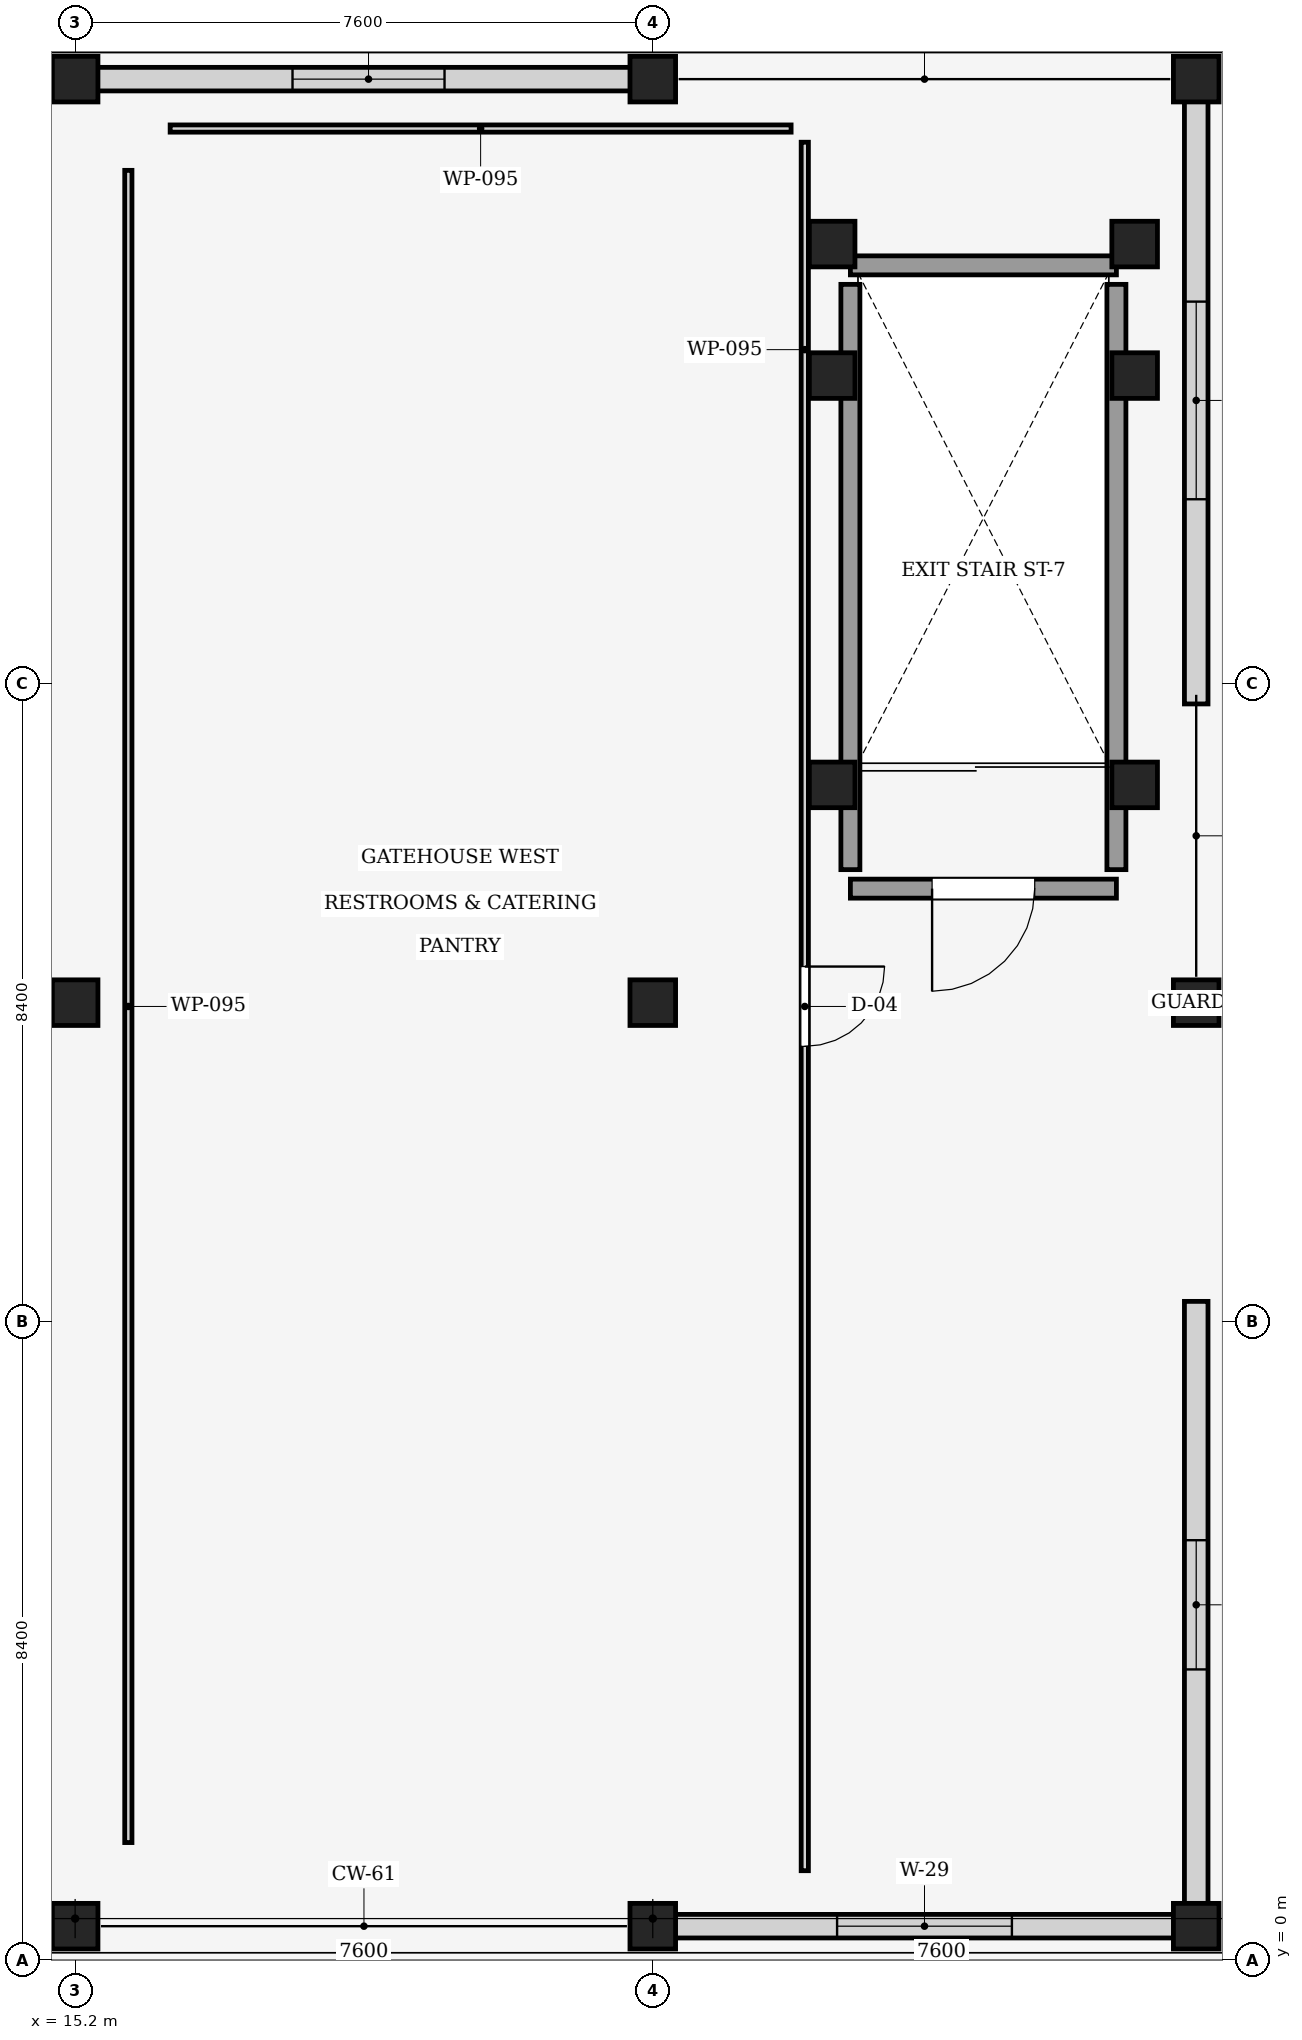
"""IFC4 building model, lengths in metres.
Left out: names, types, materials, properties, quantities, classifications, styles, units other than length and angle.
Written with IfcOpenShell. Run it as: python <this file> out.ifc"""

import sys

from ifc_helpers import new_model, si_unit, direction, frame, frame_2d, origin, origin_2d, place, context, subcontext, project, spatial, rectangle, extrude, element, fill, save


model = new_model("IFC4")
c1 = context("Model", 3, precision=1e-05, world=origin(), true_north=direction((0.0, 1.0)))
c2 = subcontext(c1, "Body", "Model", "MODEL_VIEW")
j1 = project(units=[si_unit("LENGTHUNIT", "METRE"), si_unit("PLANEANGLEUNIT", "RADIAN")], contexts=[c1])
p1 = place(None, origin())
s1 = spatial("IfcSite", under=j1, at=p1, CompositionType="ELEMENT")
p2 = place(p1, origin())
s2 = spatial("IfcBuilding", under=s1, at=p2, CompositionType="ELEMENT")
p3 = place(p2, frame((0.0, 0.0, 5.1)))
s3 = spatial("IfcBuildingStorey", under=s2, at=p3, CompositionType="ELEMENT", Elevation=5.1)
p4 = place(p3, frame((15.2, 0.45, 0.0), z_axis=(0.0, 0.0, 1.0), x_axis=(1.0, 0.0, 0.0)))
e1 = element("IfcColumn", 1, at=p4, inside=s3, PredefinedType="COLUMN", context=c2, shape_type="SweptSolid", body=[
    extrude(rectangle(XDim=0.6, YDim=0.6, at=origin_2d()), origin(), (0.0, 0.0, 1.0), 4.05),
])
p5 = place(p3, frame((15.2, 12.6, 0.0), z_axis=(0.0, 0.0, 1.0), x_axis=(1.0, 0.0, 0.0)))
e2 = element("IfcColumn", 2, at=p5, inside=s3, PredefinedType="COLUMN", context=c2, shape_type="SweptSolid", body=[
    extrude(rectangle(XDim=0.6, YDim=0.6, at=origin_2d()), origin(), (0.0, 0.0, 1.0), 7.0),
])
for number, where, z_axis, x_axis in (
    (3, (15.2, 24.75, 0.0), (0.0, 0.0, 1.0), (1.0, 0.0, 0.0)),
    (4, (22.8, 0.45, 0.0), (0.0, 0.0, 1.0), (1.0, 0.0, 0.0)),
):
    element("IfcColumn", number, at=place(p3, frame(where, z_axis=z_axis, x_axis=x_axis)), inside=s3, PredefinedType="COLUMN", context=c2, shape_type="SweptSolid", body=[
        extrude(rectangle(XDim=0.6, YDim=0.6, at=origin_2d()), origin(), (0.0, 0.0, 1.0), 4.05),
    ])
p6 = place(p3, frame((22.8, 12.6, 0.0), z_axis=(0.0, 0.0, 1.0), x_axis=(1.0, 0.0, 0.0)))
e5 = element("IfcColumn", 5, at=p6, inside=s3, PredefinedType="COLUMN", context=c2, shape_type="SweptSolid", body=[
    extrude(rectangle(XDim=0.6, YDim=0.6, at=origin_2d()), origin(), (0.0, 0.0, 1.0), 7.0),
])
for number, where, z_axis, x_axis in (
    (6, (22.8, 24.75, 0.0), (0.0, 0.0, 1.0), (1.0, 0.0, 0.0)),
    (7, (29.95, 0.45, 0.0), (0.0, 0.0, 1.0), (1.0, 0.0, 0.0)),
):
    element("IfcColumn", number, at=place(p3, frame(where, z_axis=z_axis, x_axis=x_axis)), inside=s3, PredefinedType="COLUMN", context=c2, shape_type="SweptSolid", body=[
        extrude(rectangle(XDim=0.6, YDim=0.6, at=origin_2d()), origin(), (0.0, 0.0, 1.0), 4.05),
    ])
p7 = place(p3, frame((29.95, 12.6, 0.0), z_axis=(0.0, 0.0, 1.0), x_axis=(1.0, 0.0, 0.0)))
e8 = element("IfcColumn", 8, at=p7, inside=s3, PredefinedType="COLUMN", context=c2, shape_type="SweptSolid", body=[
    extrude(rectangle(XDim=0.6, YDim=0.6, at=origin_2d()), origin(), (0.0, 0.0, 1.0), 7.0),
])
for number, where, z_axis, x_axis in (
    (9, (29.95, 24.75, 0.0), (0.0, 0.0, 1.0), (1.0, 0.0, 0.0)),
    (10, (29.14, 15.465, 0.0), (0.0, 0.0, 1.0), (1.0, 0.0, 0.0)),
    (11, (25.16, 15.465, 0.0), (0.0, 0.0, 1.0), (1.0, 0.0, 0.0)),
    (12, (29.14, 20.85, 0.0), (0.0, 0.0, 1.0), (1.0, 0.0, 0.0)),
    (13, (25.16, 20.85, 0.0), (0.0, 0.0, 1.0), (1.0, 0.0, 0.0)),
    (14, (29.14, 22.58, 0.0), (0.0, 0.0, 1.0), (1.0, 0.0, 0.0)),
    (15, (25.16, 22.58, 0.0), (0.0, 0.0, 1.0), (1.0, 0.0, 0.0)),
):
    element("IfcColumn", number, at=place(p3, frame(where, z_axis=z_axis, x_axis=x_axis)), inside=s3, PredefinedType="COLUMN", context=c2, shape_type="SweptSolid", body=[
        extrude(rectangle(XDim=0.6, YDim=0.6, at=origin_2d()), origin(), (0.0, 0.0, 1.0), 4.05),
    ])
p8 = place(p3, frame((29.715, 0.45, 0.0), z_axis=(0.0, 0.0, 1.0), x_axis=(-1.0, 0.0, 0.0)))
e16 = element("IfcWall", 16, at=p8, inside=s3, PredefinedType="STANDARD", context=c2, shape_type="SweptSolid", body=[
    extrude(rectangle(XDim=6.68, YDim=0.31, at=frame_2d((3.34, 0.0))), origin(), (0.0, 0.0, 1.0), 3.405),
])
p9 = place(p8, frame((2.19, 0.0, 0.85)))
e17 = element("IfcOpeningElement", 17, at=p9, cuts=e16, PredefinedType="OPENING", context=c2, shape_type="SweptSolid", body=[
    extrude(rectangle(XDim=2.3, YDim=1.85, at=frame_2d((1.15, 0.925))), frame((0.0, 0.165, 0.0), z_axis=(0.0, -1.0, 0.0), x_axis=(1.0, 0.0, 0.0)), (0.0, 0.0, 1.0), 0.33),
])
p10 = place(p3, frame((14.965, 0.45, 0.0), z_axis=(0.0, 0.0, 1.0), x_axis=(-1.0, 0.0, 0.0)))
e18 = element("IfcWall", 18, at=p10, inside=s3, PredefinedType="STANDARD", context=c2, shape_type="SweptSolid", body=[
    extrude(rectangle(XDim=7.25, YDim=0.31, at=frame_2d((3.625, 0.0))), origin(), (0.0, 0.0, 1.0), 3.405),
])
p11 = place(p10, frame((2.925, 0.0, 0.85)))
e19 = element("IfcOpeningElement", 19, at=p11, cuts=e18, PredefinedType="OPENING", context=c2, shape_type="SweptSolid", body=[
    extrude(rectangle(XDim=1.4, YDim=2.05, at=frame_2d((0.7, 1.025))), frame((0.0, 0.165, 0.0), z_axis=(0.0, -1.0, 0.0), x_axis=(1.0, 0.0, 0.0)), (0.0, 0.0, 1.0), 0.33),
])
p12 = place(p3, frame((29.95, 24.515, 0.0), z_axis=(0.0, 0.0, 1.0), x_axis=(0.0, -1.0, 0.0)))
e20 = element("IfcWall", 20, at=p12, inside=s3, PredefinedType="STANDARD", context=c2, shape_type="SweptSolid", body=[
    extrude(rectangle(XDim=7.985, YDim=0.31, at=frame_2d((3.992, 0.0))), origin(), (0.0, 0.0, 1.0), 3.405),
])
p13 = place(p12, frame((2.692, 0.0, 0.85)))
e21 = element("IfcOpeningElement", 21, at=p13, cuts=e20, PredefinedType="OPENING", context=c2, shape_type="SweptSolid", body=[
    extrude(rectangle(XDim=2.6, YDim=1.85, at=frame_2d((1.3, 0.925))), frame((0.0, 0.165, 0.0), z_axis=(0.0, -1.0, 0.0), x_axis=(1.0, 0.0, 0.0)), (0.0, 0.0, 1.0), 0.33),
])
p14 = place(p3, frame((29.95, 8.67, 0.0), z_axis=(0.0, 0.0, 1.0), x_axis=(0.0, -1.0, 0.0)))
e22 = element("IfcWall", 22, at=p14, inside=s3, PredefinedType="STANDARD", context=c2, shape_type="SweptSolid", body=[
    extrude(rectangle(XDim=7.985, YDim=0.31, at=frame_2d((3.992, 0.0))), origin(), (0.0, 0.0, 1.0), 3.405),
])
p15 = place(p14, frame((3.142, 0.0, 0.85)))
e23 = element("IfcOpeningElement", 23, at=p15, cuts=e22, PredefinedType="OPENING", context=c2, shape_type="SweptSolid", body=[
    extrude(rectangle(XDim=1.7, YDim=2.05, at=frame_2d((0.85, 1.025))), frame((0.0, 0.165, 0.0), z_axis=(0.0, -1.0, 0.0), x_axis=(1.0, 0.0, 0.0)), (0.0, 0.0, 1.0), 0.33),
])
p16 = place(p3, frame((15.435, 24.75, 0.0), z_axis=(0.0, 0.0, 1.0), x_axis=(1.0, 0.0, 0.0)))
e24 = element("IfcWall", 24, at=p16, inside=s3, PredefinedType="STANDARD", context=c2, shape_type="SweptSolid", body=[
    extrude(rectangle(XDim=7.25, YDim=0.31, at=frame_2d((3.625, 0.0))), origin(), (0.0, 0.0, 1.0), 3.405),
])
p17 = place(p16, frame((2.625, 0.0, 0.85)))
e25 = element("IfcOpeningElement", 25, at=p17, cuts=e24, PredefinedType="OPENING", context=c2, shape_type="SweptSolid", body=[
    extrude(rectangle(XDim=2.0, YDim=2.05, at=frame_2d((1.0, 1.025))), frame((0.0, 0.165, 0.0), z_axis=(0.0, -1.0, 0.0), x_axis=(1.0, 0.0, 0.0)), (0.0, 0.0, 1.0), 0.33),
])
p18 = place(p3, frame((28.9, 14.1, 0.0), z_axis=(0.0, 0.0, 1.0), x_axis=(-1.0, 0.0, 0.0)))
e26 = element("IfcWall", 26, at=p18, inside=s3, PredefinedType="SHEAR", context=c2, shape_type="SweptSolid", body=[
    extrude(rectangle(XDim=3.5, YDim=0.25, at=frame_2d((1.75, 0.0))), origin(), (0.0, 0.0, 1.0), 4.05),
])
p19 = place(p18, frame((1.075, 0.0, 0.0)))
e27 = element("IfcOpeningElement", 27, at=p19, cuts=e26, PredefinedType="OPENING", context=c2, shape_type="SweptSolid", body=[
    extrude(rectangle(XDim=1.35, YDim=2.2, at=frame_2d((0.675, 1.1))), frame((0.0, 0.135, 0.0), z_axis=(0.0, -1.0, 0.0), x_axis=(1.0, 0.0, 0.0)), (0.0, 0.0, 1.0), 0.27),
])
p20 = place(p3, frame((25.4, 14.35, 0.0), z_axis=(0.0, 0.0, 1.0), x_axis=(0.0, 1.0, 0.0)))
e28 = element("IfcWall", 28, at=p20, inside=s3, PredefinedType="SHEAR", context=c2, shape_type="SweptSolid", body=[
    extrude(rectangle(XDim=7.7, YDim=0.25, at=frame_2d((3.85, 0.0))), origin(), (0.0, 0.0, 1.0), 4.05),
])
p21 = place(p3, frame((25.4, 22.3, 0.0), z_axis=(0.0, 0.0, 1.0), x_axis=(1.0, 0.0, 0.0)))
e29 = element("IfcWall", 29, at=p21, inside=s3, PredefinedType="SHEAR", context=c2, shape_type="SweptSolid", body=[
    extrude(rectangle(XDim=3.5, YDim=0.25, at=frame_2d((1.75, 0.0))), origin(), (0.0, 0.0, 1.0), 4.05),
])
p22 = place(p3, frame((28.9, 22.05, 0.0), z_axis=(0.0, 0.0, 1.0), x_axis=(0.0, -1.0, 0.0)))
e30 = element("IfcWall", 30, at=p22, inside=s3, PredefinedType="SHEAR", context=c2, shape_type="SweptSolid", body=[
    extrude(rectangle(XDim=7.7, YDim=0.25, at=frame_2d((3.85, 0.0))), origin(), (0.0, 0.0, 1.0), 4.05),
])
p23 = place(p3, frame((24.8, 23.92, 0.0), z_axis=(0.0, 0.0, 1.0), x_axis=(0.0, -1.0, 0.0)))
e31 = element("IfcWall", 31, at=p23, inside=s3, PredefinedType="PARTITIONING", context=c2, shape_type="SweptSolid", body=[
    extrude(rectangle(XDim=22.74, YDim=0.095, at=frame_2d((11.37, 0.0))), origin(), (0.0, 0.0, 1.0), 3.67),
])
p24 = place(p23, frame((10.845, 0.0, 0.0)))
e32 = element("IfcOpeningElement", 32, at=p24, cuts=e31, PredefinedType="OPENING", context=c2, shape_type="SweptSolid", body=[
    extrude(rectangle(XDim=1.05, YDim=2.1, at=frame_2d((0.525, 1.05))), frame((0.0, 0.057, 0.0), z_axis=(0.0, -1.0, 0.0), x_axis=(1.0, 0.0, 0.0)), (0.0, 0.0, 1.0), 0.115),
])
p25 = place(p3, frame((15.9, 1.55, 0.0), z_axis=(0.0, 0.0, 1.0), x_axis=(0.0, 1.0, 0.0)))
e33 = element("IfcWall", 33, at=p25, inside=s3, PredefinedType="PARTITIONING", context=c2, shape_type="SweptSolid", body=[
    extrude(rectangle(XDim=22.0, YDim=0.095, at=frame_2d((11.0, 0.0))), origin(), (0.0, 0.0, 1.0), 3.67),
])
p26 = place(p3, frame((16.45, 24.1, 0.0), z_axis=(0.0, 0.0, 1.0), x_axis=(1.0, 0.0, 0.0)))
e34 = element("IfcWall", 34, at=p26, inside=s3, PredefinedType="PARTITIONING", context=c2, shape_type="SweptSolid", body=[
    extrude(rectangle(XDim=8.17, YDim=0.095, at=frame_2d((4.085, 0.0))), origin(), (0.0, 0.0, 1.0), 3.67),
])
p27 = place(p9, origin())
e35 = element("IfcWindow", 35, at=p27, inside=s3, PartitioningType="SINGLE_PANEL", PredefinedType="WINDOW", context=c2, shape_type="SweptSolid", body=[
    extrude(rectangle(XDim=2.3, YDim=1.85, at=frame_2d((1.15, 0.925))), frame((0.0, 0.03, 0.0), z_axis=(0.0, -1.0, 0.0), x_axis=(1.0, 0.0, 0.0)), (0.0, 0.0, 1.0), 0.06),
])
fill(e17, e35)
p28 = place(p13, origin())
e36 = element("IfcWindow", 36, at=p28, inside=s3, PartitioningType="SINGLE_PANEL", PredefinedType="WINDOW", context=c2, shape_type="SweptSolid", body=[
    extrude(rectangle(XDim=2.6, YDim=1.85, at=frame_2d((1.3, 0.925))), frame((0.0, 0.03, 0.0), z_axis=(0.0, -1.0, 0.0), x_axis=(1.0, 0.0, 0.0)), (0.0, 0.0, 1.0), 0.06),
])
fill(e21, e36)
p29 = place(p15, origin())
e37 = element("IfcWindow", 37, at=p29, inside=s3, PartitioningType="SINGLE_PANEL", PredefinedType="WINDOW", context=c2, shape_type="SweptSolid", body=[
    extrude(rectangle(XDim=1.7, YDim=2.05, at=frame_2d((0.85, 1.025))), frame((0.0, 0.03, 0.0), z_axis=(0.0, -1.0, 0.0), x_axis=(1.0, 0.0, 0.0)), (0.0, 0.0, 1.0), 0.06),
])
fill(e23, e37)
p30 = place(p17, origin())
e38 = element("IfcWindow", 38, at=p30, inside=s3, PartitioningType="SINGLE_PANEL", PredefinedType="WINDOW", context=c2, shape_type="SweptSolid", body=[
    extrude(rectangle(XDim=2.0, YDim=2.05, at=frame_2d((1.0, 1.025))), frame((0.0, 0.03, 0.0), z_axis=(0.0, -1.0, 0.0), x_axis=(1.0, 0.0, 0.0)), (0.0, 0.0, 1.0), 0.06),
])
fill(e25, e38)
p31 = place(p19, origin())
e39 = element("IfcDoor", 39, at=p31, inside=s3, OperationType="SINGLE_SWING_RIGHT", PredefinedType="DOOR", context=c2, shape_type="SweptSolid", body=[
    extrude(rectangle(XDim=1.35, YDim=2.2, at=frame_2d((0.675, 1.1))), frame((0.0, 0.025, 0.0), z_axis=(0.0, -1.0, 0.0), x_axis=(1.0, 0.0, 0.0)), (0.0, 0.0, 1.0), 0.05),
])
fill(e27, e39)
p32 = place(p24, origin())
e40 = element("IfcDoor", 40, at=p32, inside=s3, OperationType="SINGLE_SWING_LEFT", PredefinedType="DOOR", context=c2, shape_type="SweptSolid", body=[
    extrude(rectangle(XDim=1.05, YDim=2.1, at=frame_2d((0.525, 1.05))), frame((0.0, 0.025, 0.0), z_axis=(0.0, -1.0, 0.0), x_axis=(1.0, 0.0, 0.0)), (0.0, 0.0, 1.0), 0.05),
])
fill(e32, e40)
save(model, sys.argv[1])
